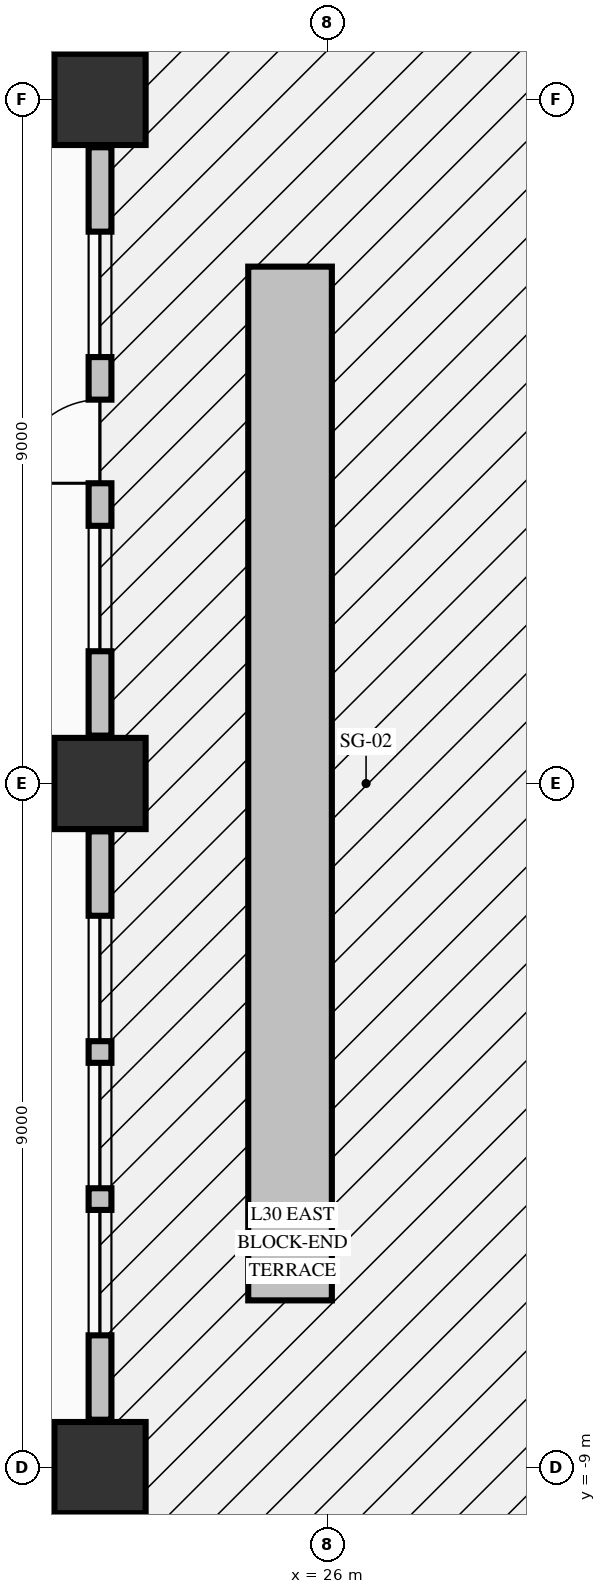
"""IFC4 building model, lengths in metres.
Left out: names, types, materials, properties, quantities, classifications, styles, units other than length and angle.
Written with IfcOpenShell. Run it as: python <this file> out.ifc"""

import sys

from ifc_helpers import new_model, si_unit, direction, frame, frame_2d, origin, origin_2d, place, context, subcontext, project, spatial, rectangle, extrude, element, fill, save


model = new_model("IFC4")
c1 = context("Model", 3, precision=1e-05, world=origin(), true_north=direction((0.0, 1.0)))
c2 = subcontext(c1, "Body", "Model", "MODEL_VIEW")
j1 = project(units=[si_unit("LENGTHUNIT", "METRE"), si_unit("PLANEANGLEUNIT", "RADIAN")], contexts=[c1])
p1 = place(None, origin())
s1 = spatial("IfcSite", under=j1, at=p1, CompositionType="ELEMENT")
p2 = place(p1, origin())
s2 = spatial("IfcBuilding", under=s1, at=p2, CompositionType="ELEMENT")
p3 = place(p2, frame((0.0, 0.0, 121.35)))
s3 = spatial("IfcBuildingStorey", under=s2, at=p3, CompositionType="ELEMENT", Elevation=121.35)
for number, where, z_axis, x_axis in (
    (1, (23.0, -9.0, -0.425), (0.0, 0.0, 1.0), (1.0, 0.0, 0.0)),
    (2, (23.0, 0.0, -0.425), (0.0, 0.0, 1.0), (1.0, 0.0, 0.0)),
    (3, (23.0, 9.0, -0.425), (0.0, 0.0, 1.0), (1.0, 0.0, 0.0)),
):
    element("IfcColumn", number, at=place(p3, frame(where, z_axis=z_axis, x_axis=x_axis)), inside=s3, PredefinedType="COLUMN", context=c2, shape_type="SweptSolid", body=[
        extrude(rectangle(XDim=1.2, YDim=1.2, at=origin_2d()), origin(), (0.0, 0.0, 1.0), 3.745),
    ])
p4 = place(p3, frame((23.0, -8.37, 0.0), z_axis=(0.0, 0.0, 1.0), x_axis=(0.0, 1.0, 0.0)))
e4 = element("IfcWall", 4, at=p4, inside=s3, PredefinedType="STANDARD", context=c2, shape_type="SweptSolid", body=[
    extrude(rectangle(XDim=7.74, YDim=0.3, at=frame_2d((3.87, 0.0))), origin(), (0.0, 0.0, 1.0), 2.712),
])
p5 = place(p4, frame((1.11, 0.0, 0.8)))
e5 = element("IfcOpeningElement", 5, at=p5, cuts=e4, PredefinedType="OPENING", context=c2, shape_type="SweptSolid", body=[
    extrude(rectangle(XDim=1.65, YDim=1.7, at=frame_2d((0.825, 0.85))), frame((0.0, 0.16, 0.0), z_axis=(0.0, -1.0, 0.0), x_axis=(1.0, 0.0, 0.0)), (0.0, 0.0, 1.0), 0.32),
])
p6 = place(p4, frame((3.045, 0.0, 0.8)))
e6 = element("IfcOpeningElement", 6, at=p6, cuts=e4, PredefinedType="OPENING", context=c2, shape_type="SweptSolid", body=[
    extrude(rectangle(XDim=1.65, YDim=1.7, at=frame_2d((0.825, 0.85))), frame((0.0, 0.16, 0.0), z_axis=(0.0, -1.0, 0.0), x_axis=(1.0, 0.0, 0.0)), (0.0, 0.0, 1.0), 0.32),
])
p7 = place(p4, frame((4.98, 0.0, 0.8)))
e7 = element("IfcOpeningElement", 7, at=p7, cuts=e4, PredefinedType="OPENING", context=c2, shape_type="SweptSolid", body=[
    extrude(rectangle(XDim=1.65, YDim=1.7, at=frame_2d((0.825, 0.85))), frame((0.0, 0.16, 0.0), z_axis=(0.0, -1.0, 0.0), x_axis=(1.0, 0.0, 0.0)), (0.0, 0.0, 1.0), 0.32),
])
p8 = place(p3, frame((23.0, 0.63, 0.0), z_axis=(0.0, 0.0, 1.0), x_axis=(0.0, 1.0, 0.0)))
e8 = element("IfcWall", 8, at=p8, inside=s3, PredefinedType="STANDARD", context=c2, shape_type="SweptSolid", body=[
    extrude(rectangle(XDim=7.74, YDim=0.3, at=frame_2d((3.87, 0.0))), origin(), (0.0, 0.0, 1.0), 2.712),
])
p9 = place(p8, frame((3.32, 0.0, 0.0)))
e9 = element("IfcOpeningElement", 9, at=p9, cuts=e8, PredefinedType="OPENING", context=c2, shape_type="SweptSolid", body=[
    extrude(rectangle(XDim=1.1, YDim=2.15, at=frame_2d((0.55, 1.075))), frame((0.0, 0.16, 0.0), z_axis=(0.0, -1.0, 0.0), x_axis=(1.0, 0.0, 0.0)), (0.0, 0.0, 1.0), 0.32),
])
p10 = place(p8, frame((1.11, 0.0, 0.8)))
e10 = element("IfcOpeningElement", 10, at=p10, cuts=e8, PredefinedType="OPENING", context=c2, shape_type="SweptSolid", body=[
    extrude(rectangle(XDim=1.65, YDim=1.7, at=frame_2d((0.825, 0.85))), frame((0.0, 0.16, 0.0), z_axis=(0.0, -1.0, 0.0), x_axis=(1.0, 0.0, 0.0)), (0.0, 0.0, 1.0), 0.32),
])
p11 = place(p8, frame((4.98, 0.0, 0.8)))
e11 = element("IfcOpeningElement", 11, at=p11, cuts=e8, PredefinedType="OPENING", context=c2, shape_type="SweptSolid", body=[
    extrude(rectangle(XDim=1.65, YDim=1.7, at=frame_2d((0.825, 0.85))), frame((0.0, 0.16, 0.0), z_axis=(0.0, -1.0, 0.0), x_axis=(1.0, 0.0, 0.0)), (0.0, 0.0, 1.0), 0.32),
])
p12 = place(p3, frame((25.5, -6.8, -0.04), z_axis=(0.0, 0.0, 1.0), x_axis=(0.0, 1.0, 0.0)))
e12 = element("IfcWall", 12, at=p12, inside=s3, PredefinedType="PARAPET", context=c2, shape_type="SweptSolid", body=[
    extrude(rectangle(XDim=13.6, YDim=1.1, at=frame_2d((6.8, 0.0))), origin(), (0.0, 0.0, 1.0), 0.6),
])
p13 = place(p5, origin())
e13 = element("IfcWindow", 13, at=p13, inside=s3, PartitioningType="SINGLE_PANEL", PredefinedType="WINDOW", context=c2, shape_type="SweptSolid", body=[
    extrude(rectangle(XDim=1.65, YDim=1.7, at=frame_2d((0.825, 0.85))), frame((0.0, 0.03, 0.0), z_axis=(0.0, -1.0, 0.0), x_axis=(1.0, 0.0, 0.0)), (0.0, 0.0, 1.0), 0.06),
])
fill(e5, e13)
p14 = place(p6, origin())
e14 = element("IfcWindow", 14, at=p14, inside=s3, PartitioningType="SINGLE_PANEL", PredefinedType="WINDOW", context=c2, shape_type="SweptSolid", body=[
    extrude(rectangle(XDim=1.65, YDim=1.7, at=frame_2d((0.825, 0.85))), frame((0.0, 0.03, 0.0), z_axis=(0.0, -1.0, 0.0), x_axis=(1.0, 0.0, 0.0)), (0.0, 0.0, 1.0), 0.06),
])
fill(e6, e14)
p15 = place(p7, origin())
e15 = element("IfcWindow", 15, at=p15, inside=s3, PartitioningType="SINGLE_PANEL", PredefinedType="WINDOW", context=c2, shape_type="SweptSolid", body=[
    extrude(rectangle(XDim=1.65, YDim=1.7, at=frame_2d((0.825, 0.85))), frame((0.0, 0.03, 0.0), z_axis=(0.0, -1.0, 0.0), x_axis=(1.0, 0.0, 0.0)), (0.0, 0.0, 1.0), 0.06),
])
fill(e7, e15)
p16 = place(p9, origin())
e16 = element("IfcDoor", 16, at=p16, inside=s3, OperationType="SINGLE_SWING_LEFT", PredefinedType="DOOR", context=c2, shape_type="SweptSolid", body=[
    extrude(rectangle(XDim=1.1, YDim=2.15, at=frame_2d((0.55, 1.075))), frame((0.0, 0.025, 0.0), z_axis=(0.0, -1.0, 0.0), x_axis=(1.0, 0.0, 0.0)), (0.0, 0.0, 1.0), 0.05),
])
fill(e9, e16)
p17 = place(p10, origin())
e17 = element("IfcWindow", 17, at=p17, inside=s3, PartitioningType="SINGLE_PANEL", PredefinedType="WINDOW", context=c2, shape_type="SweptSolid", body=[
    extrude(rectangle(XDim=1.65, YDim=1.7, at=frame_2d((0.825, 0.85))), frame((0.0, 0.03, 0.0), z_axis=(0.0, -1.0, 0.0), x_axis=(1.0, 0.0, 0.0)), (0.0, 0.0, 1.0), 0.06),
])
fill(e10, e17)
p18 = place(p11, origin())
e18 = element("IfcWindow", 18, at=p18, inside=s3, PartitioningType="SINGLE_PANEL", PredefinedType="WINDOW", context=c2, shape_type="SweptSolid", body=[
    extrude(rectangle(XDim=1.65, YDim=1.7, at=frame_2d((0.825, 0.85))), frame((0.0, 0.03, 0.0), z_axis=(0.0, -1.0, 0.0), x_axis=(1.0, 0.0, 0.0)), (0.0, 0.0, 1.0), 0.06),
])
fill(e11, e18)
save(model, sys.argv[1])
